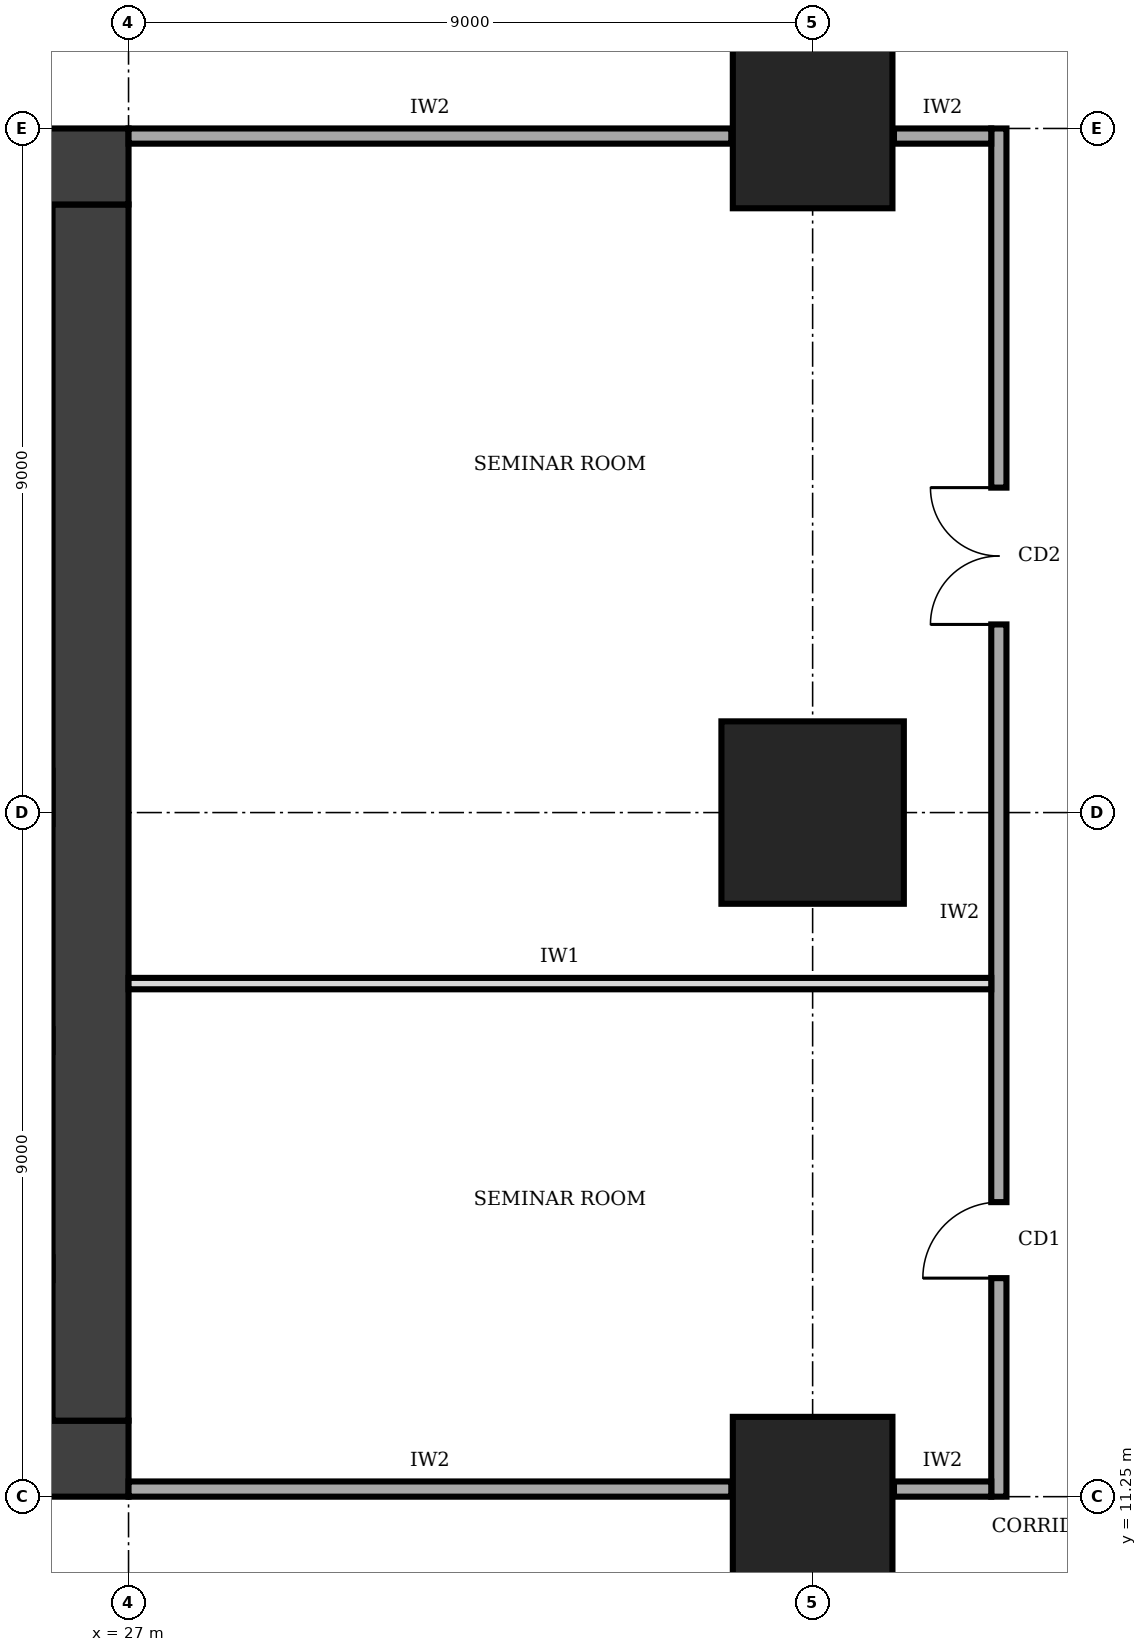
"""IFC4 building model, lengths in metres.
Left out: names, types, materials, properties, quantities, classifications, styles, units other than length and angle.
Written with IfcOpenShell. Run it as: python <this file> out.ifc"""

import sys

from ifc_helpers import new_model, si_unit, direction, frame, frame_2d, origin, origin_2d, place, context, subcontext, project, spatial, rectangle, extrude, element, fill, save


model = new_model("IFC4")
c1 = context("Model", 3, precision=1e-05, world=origin(), true_north=direction((0.0, 1.0)))
c2 = subcontext(c1, "Body", "Model", "MODEL_VIEW")
j1 = project(units=[si_unit("LENGTHUNIT", "METRE"), si_unit("PLANEANGLEUNIT", "RADIAN")], contexts=[c1])
p1 = place(None, origin())
s1 = spatial("IfcSite", under=j1, at=p1, CompositionType="ELEMENT")
p2 = place(p1, origin())
s2 = spatial("IfcBuilding", under=s1, at=p2, CompositionType="ELEMENT")
p3 = place(p2, frame((0.0, 0.0, 165.0)))
s3 = spatial("IfcBuildingStorey", under=s2, at=p3, CompositionType="ELEMENT", Elevation=165.0)
p4 = place(p3, frame((13.5, 11.75, 0.0), z_axis=(0.0, 0.0, 1.0), x_axis=(1.0, 0.0, 0.0)))
e1 = element("IfcWall", 1, at=p4, inside=s3, PredefinedType="SHEAR", context=c2, shape_type="SweptSolid", body=[
    extrude(rectangle(XDim=13.5, YDim=1.0, at=frame_2d((6.75, 0.0))), origin(), (0.0, 0.0, 1.0), 4.0),
])
p5 = place(p4, frame((4.75, 0.0, 0.0)))
e2 = element("IfcOpeningElement", 2, at=p5, cuts=e1, PredefinedType="OPENING", context=c2, shape_type="SweptSolid", body=[
    extrude(rectangle(XDim=1.0, YDim=2.1, at=frame_2d((0.5, 1.05))), frame((0.0, 0.51, 0.0), z_axis=(0.0, -1.0, 0.0), x_axis=(1.0, 0.0, 0.0)), (0.0, 0.0, 1.0), 1.02),
])
p6 = place(p3, frame((26.5, 12.25, 0.0), z_axis=(0.0, 0.0, 1.0), x_axis=(0.0, 1.0, 0.0)))
e3 = element("IfcWall", 3, at=p6, inside=s3, PredefinedType="SHEAR", context=c2, shape_type="SweptSolid", body=[
    extrude(rectangle(XDim=16.0, YDim=1.0, at=frame_2d((8.0, 0.0))), origin(), (0.0, 0.0, 1.0), 4.0),
])
p7 = place(p3, frame((27.0, 28.75, 0.0), z_axis=(0.0, 0.0, 1.0), x_axis=(-1.0, 0.0, 0.0)))
e4 = element("IfcWall", 4, at=p7, inside=s3, PredefinedType="SHEAR", context=c2, shape_type="SweptSolid", body=[
    extrude(rectangle(XDim=13.5, YDim=1.0, at=frame_2d((6.75, 0.0))), origin(), (0.0, 0.0, 1.0), 4.0),
])
p8 = place(p7, frame((4.75, 0.0, 0.0)))
e5 = element("IfcOpeningElement", 5, at=p8, cuts=e4, PredefinedType="OPENING", context=c2, shape_type="SweptSolid", body=[
    extrude(rectangle(XDim=1.8, YDim=2.1, at=frame_2d((0.9, 1.05))), frame((0.0, 0.51, 0.0), z_axis=(0.0, -1.0, 0.0), x_axis=(1.0, 0.0, 0.0)), (0.0, 0.0, 1.0), 1.02),
])
p9 = place(p3, frame((36.0, 11.25, 0.0), z_axis=(0.0, 0.0, 1.0), x_axis=(1.0, 0.0, 0.0)))
e6 = element("IfcColumn", 6, at=p9, inside=s3, PredefinedType="COLUMN", context=c2, shape_type="SweptSolid", body=[
    extrude(rectangle(XDim=2.1, YDim=2.1, at=origin_2d()), origin(), (0.0, 0.0, 1.0), 4.0),
])
p10 = place(p3, frame((36.0, 20.25, 0.0), z_axis=(0.0, 0.0, 1.0), x_axis=(1.0, 0.0, 0.0)))
e7 = element("IfcColumn", 7, at=p10, inside=s3, PredefinedType="COLUMN", context=c2, shape_type="SweptSolid", body=[
    extrude(rectangle(XDim=2.4, YDim=2.4, at=origin_2d()), origin(), (0.0, 0.0, 1.0), 4.0),
])
p11 = place(p3, frame((36.0, 29.25, 0.0), z_axis=(0.0, 0.0, 1.0), x_axis=(1.0, 0.0, 0.0)))
e8 = element("IfcColumn", 8, at=p11, inside=s3, PredefinedType="COLUMN", context=c2, shape_type="SweptSolid", body=[
    extrude(rectangle(XDim=2.1, YDim=2.1, at=origin_2d()), origin(), (0.0, 0.0, 1.0), 4.0),
])
p12 = place(p3, frame((38.45, 11.25, 0.0), z_axis=(0.0, 0.0, 1.0), x_axis=(0.0, 1.0, 0.0)))
e9 = element("IfcWall", 9, at=p12, inside=s3, PredefinedType="SOLIDWALL", context=c2, shape_type="SweptSolid", body=[
    extrude(rectangle(XDim=18.0, YDim=0.2, at=frame_2d((9.0, 0.0))), origin(), (0.0, 0.0, 1.0), 3.75),
])
p13 = place(p12, frame((2.875, 0.0, 0.0)))
e10 = element("IfcOpeningElement", 10, at=p13, cuts=e9, PredefinedType="OPENING", context=c2, shape_type="SweptSolid", body=[
    extrude(rectangle(XDim=1.0, YDim=2.1, at=frame_2d((0.5, 1.05))), frame((0.0, 0.11, 0.0), z_axis=(0.0, -1.0, 0.0), x_axis=(1.0, 0.0, 0.0)), (0.0, 0.0, 1.0), 0.22),
])
p14 = place(p12, frame((11.475, 0.0, 0.0)))
e11 = element("IfcOpeningElement", 11, at=p14, cuts=e9, PredefinedType="OPENING", context=c2, shape_type="SweptSolid", body=[
    extrude(rectangle(XDim=1.8, YDim=2.1, at=frame_2d((0.9, 1.05))), frame((0.0, 0.11, 0.0), z_axis=(0.0, -1.0, 0.0), x_axis=(1.0, 0.0, 0.0)), (0.0, 0.0, 1.0), 0.22),
])
p15 = place(p3, frame((27.0, 11.35, 0.0), z_axis=(0.0, 0.0, 1.0), x_axis=(1.0, 0.0, 0.0)))
e12 = element("IfcWall", 12, at=p15, inside=s3, PredefinedType="SOLIDWALL", context=c2, shape_type="SweptSolid", body=[
    extrude(rectangle(XDim=7.93, YDim=0.2, at=frame_2d((3.965, 0.0))), origin(), (0.0, 0.0, 1.0), 3.75),
])
p16 = place(p3, frame((37.07, 11.35, 0.0), z_axis=(0.0, 0.0, 1.0), x_axis=(1.0, 0.0, 0.0)))
e13 = element("IfcWall", 13, at=p16, inside=s3, PredefinedType="SOLIDWALL", context=c2, shape_type="SweptSolid", body=[
    extrude(rectangle(XDim=1.28, YDim=0.2, at=frame_2d((0.64, 0.0))), origin(), (0.0, 0.0, 1.0), 2.75),
])
p17 = place(p3, frame((27.0, 29.15, 0.0), z_axis=(0.0, 0.0, 1.0), x_axis=(1.0, 0.0, 0.0)))
e14 = element("IfcWall", 14, at=p17, inside=s3, PredefinedType="SOLIDWALL", context=c2, shape_type="SweptSolid", body=[
    extrude(rectangle(XDim=7.93, YDim=0.2, at=frame_2d((3.965, 0.0))), origin(), (0.0, 0.0, 1.0), 3.75),
])
p18 = place(p3, frame((37.07, 29.15, 0.0), z_axis=(0.0, 0.0, 1.0), x_axis=(1.0, 0.0, 0.0)))
e15 = element("IfcWall", 15, at=p18, inside=s3, PredefinedType="SOLIDWALL", context=c2, shape_type="SweptSolid", body=[
    extrude(rectangle(XDim=1.28, YDim=0.2, at=frame_2d((0.64, 0.0))), origin(), (0.0, 0.0, 1.0), 2.75),
])
p19 = place(p3, frame((27.0, 18.0, 0.0), z_axis=(0.0, 0.0, 1.0), x_axis=(1.0, 0.0, 0.0)))
e16 = element("IfcWall", 16, at=p19, inside=s3, PredefinedType="PARTITIONING", context=c2, shape_type="SweptSolid", body=[
    extrude(rectangle(XDim=11.35, YDim=0.15, at=frame_2d((5.675, 0.0))), origin(), (0.0, 0.0, 1.0), 3.75),
])
p20 = place(p13, origin())
e17 = element("IfcDoor", 17, at=p20, inside=s3, OperationType="SINGLE_SWING_LEFT", PredefinedType="DOOR", context=c2, shape_type="SweptSolid", body=[
    extrude(rectangle(XDim=1.0, YDim=2.1, at=frame_2d((0.5, 1.05))), frame((0.0, 0.025, 0.0), z_axis=(0.0, -1.0, 0.0), x_axis=(1.0, 0.0, 0.0)), (0.0, 0.0, 1.0), 0.05),
])
fill(e10, e17)
p21 = place(p14, origin())
e18 = element("IfcDoor", 18, at=p21, inside=s3, OperationType="DOUBLE_DOOR_SINGLE_SWING", PredefinedType="DOOR", context=c2, shape_type="SweptSolid", body=[
    extrude(rectangle(XDim=1.8, YDim=2.1, at=frame_2d((0.9, 1.05))), frame((0.0, 0.025, 0.0), z_axis=(0.0, -1.0, 0.0), x_axis=(1.0, 0.0, 0.0)), (0.0, 0.0, 1.0), 0.05),
])
fill(e11, e18)
save(model, sys.argv[1])
